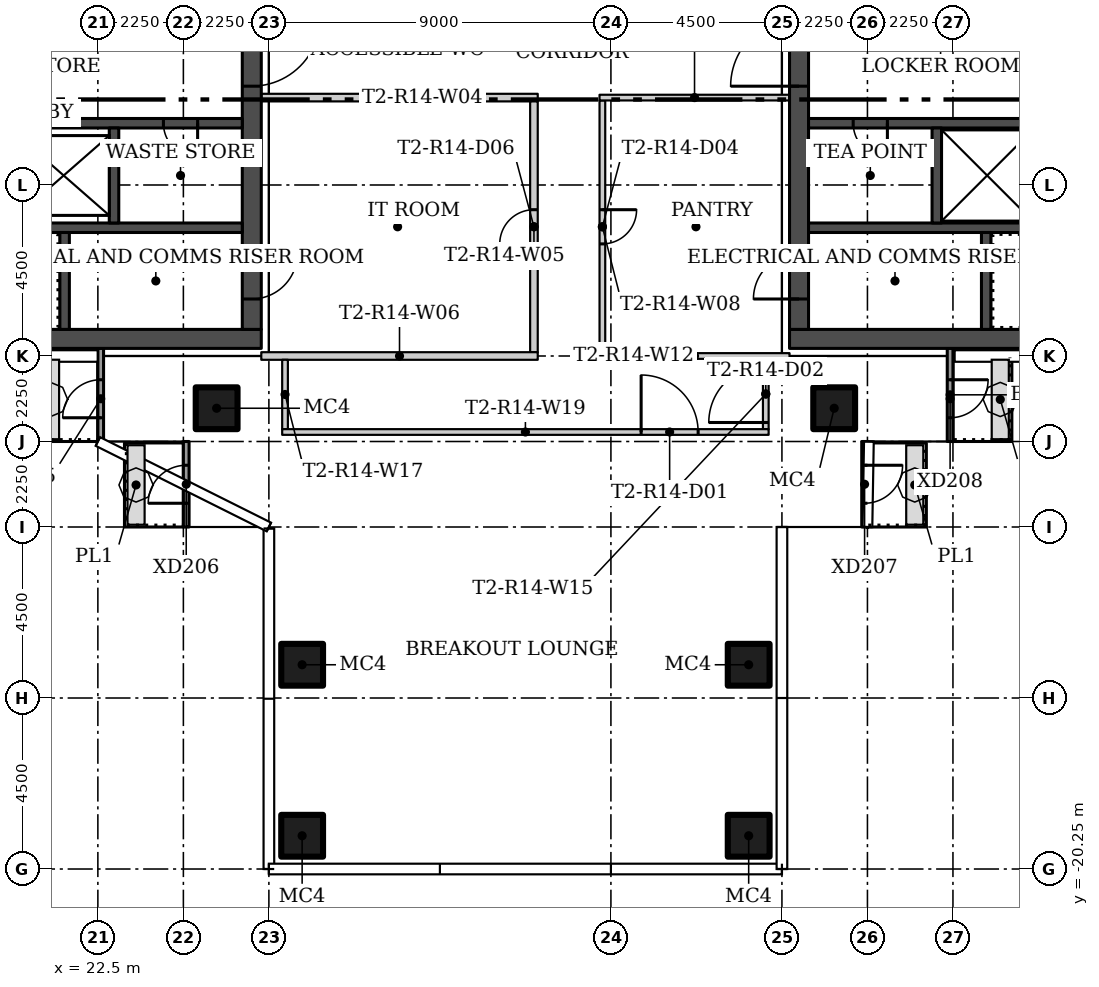
"""IFC4 building model, lengths in metres.
Left out: names, types, materials, properties, quantities, classifications, styles, units other than length and angle.
Written with IfcOpenShell. Run it as: python <this file> out.ifc"""

import sys

from ifc_helpers import new_model, si_unit, direction, frame, frame_2d, origin, origin_2d, place, context, subcontext, project, spatial, rectangle, hollow_rectangle, extrude, element, fill, save


model = new_model("IFC4")
c1 = context("Model", 3, precision=1e-05, world=origin(), true_north=direction((0.0, 1.0)))
c2 = subcontext(c1, "Body", "Model", "MODEL_VIEW")
j1 = project(units=[si_unit("LENGTHUNIT", "METRE"), si_unit("PLANEANGLEUNIT", "RADIAN")], contexts=[c1])
p1 = place(None, origin())
s1 = spatial("IfcSite", under=j1, at=p1, CompositionType="ELEMENT")
p2 = place(p1, origin())
s2 = spatial("IfcBuilding", under=s1, at=p2, CompositionType="ELEMENT")
p3 = place(p2, frame((0.0, 0.0, 138.9)))
s3 = spatial("IfcBuildingStorey", under=s2, at=p3, CompositionType="ELEMENT", Elevation=138.9)
for number, where in (
    (1, (25.625, -8.125, 0.0)),
    (2, (41.875, -8.125, 0.0)),
    (3, (39.625, -14.875, 0.0)),
    (4, (39.625, -19.375, 0.0)),
    (5, (27.875, -14.875, 0.0)),
    (6, (27.875, -19.375, 0.0)),
):
    element("IfcColumn", number, at=place(p3, frame(where)), inside=s3, PredefinedType="COLUMN", context=c2, shape_type="SweptSolid", body=[
        extrude(hollow_rectangle(XDim=1.1, YDim=1.1, WallThickness=0.04, at=origin_2d()), origin(), (0.0, 0.0, 1.0), 3.55),
    ])
p4 = place(p3, frame((34.075, 0.05, 0.0), z_axis=(0.0, 0.0, 1.0), x_axis=(-1.0, 0.0, 0.0)))
e7 = element("IfcWall", 7, at=p4, inside=s3, PredefinedType="PARTITIONING", context=c2, shape_type="SweptSolid", body=[
    extrude(rectangle(XDim=7.275, YDim=0.2, at=frame_2d((3.637, 0.0))), origin(), (0.0, 0.0, 1.0), 3.55),
])
p5 = place(p3, frame((33.975, -6.65, 0.0), z_axis=(0.0, 0.0, 1.0), x_axis=(0.0, 1.0, 0.0)))
e8 = element("IfcWall", 8, at=p5, inside=s3, PredefinedType="PARTITIONING", context=c2, shape_type="SweptSolid", body=[
    extrude(rectangle(XDim=6.6, YDim=0.2, at=frame_2d((3.3, 0.0))), origin(), (0.0, 0.0, 1.0), 3.55),
])
p6 = place(p5, frame((2.85, 0.0, 0.0)))
e9 = element("IfcOpeningElement", 9, at=p6, cuts=e8, PredefinedType="OPENING", context=c2, shape_type="SweptSolid", body=[
    extrude(rectangle(XDim=0.9, YDim=2.1, at=frame_2d((0.45, 1.05))), frame((0.0, 0.11, 0.0), z_axis=(0.0, -1.0, 0.0), x_axis=(1.0, 0.0, 0.0)), (0.0, 0.0, 1.0), 0.22),
])
p7 = place(p3, frame((26.8, -6.75, 0.0)))
e10 = element("IfcWall", 10, at=p7, inside=s3, PredefinedType="PARTITIONING", context=c2, shape_type="SweptSolid", body=[
    extrude(rectangle(XDim=7.275, YDim=0.2, at=frame_2d((3.637, 0.0))), origin(), (0.0, 0.0, 1.0), 3.55),
])
p8 = place(p3, frame((35.775, -0.025, 0.0), z_axis=(0.0, 0.0, 1.0), x_axis=(0.0, -1.0, 0.0)))
e11 = element("IfcWall", 11, at=p8, inside=s3, PredefinedType="PARTITIONING", context=c2, shape_type="SweptSolid", body=[
    extrude(rectangle(XDim=6.65, YDim=0.15, at=frame_2d((3.325, 0.0))), origin(), (0.0, 0.0, 1.0), 3.55),
])
p9 = place(p8, frame((2.875, 0.0, 0.0)))
e12 = element("IfcOpeningElement", 12, at=p9, cuts=e11, PredefinedType="OPENING", context=c2, shape_type="SweptSolid", body=[
    extrude(rectangle(XDim=0.9, YDim=2.1, at=frame_2d((0.45, 1.05))), frame((0.0, 0.085, 0.0), z_axis=(0.0, -1.0, 0.0), x_axis=(1.0, 0.0, 0.0)), (0.0, 0.0, 1.0), 0.17),
])
p10 = place(p3, frame((35.7, -6.75, 0.0)))
e13 = element("IfcWall", 13, at=p10, inside=s3, PredefinedType="PARTITIONING", context=c2, shape_type="SweptSolid", body=[
    extrude(rectangle(XDim=5.0, YDim=0.15, at=frame_2d((2.5, 0.0))), origin(), (0.0, 0.0, 1.0), 3.55),
])
p11 = place(p3, frame((40.7, 0.05, 0.0), z_axis=(0.0, 0.0, 1.0), x_axis=(-1.0, 0.0, 0.0)))
e14 = element("IfcWall", 14, at=p11, inside=s3, PredefinedType="PARTITIONING", context=c2, shape_type="SweptSolid", body=[
    extrude(rectangle(XDim=5.0, YDim=0.15, at=frame_2d((2.5, 0.0))), origin(), (0.0, 0.0, 1.0), 3.55),
])
p12 = place(p3, frame((40.075, -8.675, 0.0), z_axis=(0.0, 0.0, 1.0), x_axis=(0.0, 1.0, 0.0)))
e15 = element("IfcWall", 15, at=p12, inside=s3, PredefinedType="PARTITIONING", context=c2, shape_type="SweptSolid", body=[
    extrude(rectangle(XDim=1.85, YDim=0.15, at=frame_2d((0.925, 0.0))), origin(), (0.0, 0.0, 1.0), 3.55),
])
p13 = place(p12, frame((0.175, 0.0, 0.0)))
e16 = element("IfcOpeningElement", 16, at=p13, cuts=e15, PredefinedType="OPENING", context=c2, shape_type="SweptSolid", body=[
    extrude(rectangle(XDim=1.5, YDim=2.1, at=frame_2d((0.75, 1.05))), frame((0.0, 0.085, 0.0), z_axis=(0.0, -1.0, 0.0), x_axis=(1.0, 0.0, 0.0)), (0.0, 0.0, 1.0), 0.17),
])
p14 = place(p3, frame((27.425, -6.85, 0.0), z_axis=(0.0, 0.0, 1.0), x_axis=(0.0, -1.0, 0.0)))
e17 = element("IfcWall", 17, at=p14, inside=s3, PredefinedType="PARTITIONING", context=c2, shape_type="SweptSolid", body=[
    extrude(rectangle(XDim=1.825, YDim=0.15, at=frame_2d((0.913, 0.0))), origin(), (0.0, 0.0, 1.0), 3.55),
])
p15 = place(p3, frame((27.35, -8.75, 0.0)))
e18 = element("IfcWall", 18, at=p15, inside=s3, PredefinedType="PARTITIONING", context=c2, shape_type="SweptSolid", body=[
    extrude(rectangle(XDim=12.8, YDim=0.15, at=frame_2d((6.4, 0.0))), origin(), (0.0, 0.0, 1.0), 3.55),
])
p16 = place(p15, frame((9.445, 0.0, 0.0)))
e19 = element("IfcOpeningElement", 19, at=p16, cuts=e18, PredefinedType="OPENING", context=c2, shape_type="SweptSolid", body=[
    extrude(rectangle(XDim=1.5, YDim=2.1, at=frame_2d((0.75, 1.05))), frame((0.0, 0.085, 0.0), z_axis=(0.0, -1.0, 0.0), x_axis=(1.0, 0.0, 0.0)), (0.0, 0.0, 1.0), 0.17),
])
p17 = place(p3, frame((22.575, -9.0, 0.0), z_axis=(0.0, 0.0, 1.0), x_axis=(0.0, 1.0, 0.0)))
e20 = element("IfcWall", 20, at=p17, inside=s3, PredefinedType="SOLIDWALL", context=c2, shape_type="SweptSolid", body=[
    extrude(rectangle(XDim=2.457, YDim=0.15, at=frame_2d((1.229, 0.0))), origin(), (0.0, 0.0, 1.0), 3.45),
])
p18 = place(p17, frame((0.625, 0.0, 0.0)))
e21 = element("IfcOpeningElement", 21, at=p18, cuts=e20, PredefinedType="OPENING", context=c2, shape_type="SweptSolid", body=[
    extrude(rectangle(XDim=1.0, YDim=2.4, at=frame_2d((0.5, 1.2))), frame((0.0, 0.085, 0.0), z_axis=(0.0, -1.0, 0.0), x_axis=(1.0, 0.0, 0.0)), (0.0, 0.0, 1.0), 0.17),
])
p19 = place(p3, frame((24.825, -11.25, 0.0), z_axis=(0.0, 0.0, 1.0), x_axis=(0.0, 1.0, 0.0)))
e22 = element("IfcWall", 22, at=p19, inside=s3, PredefinedType="SOLIDWALL", context=c2, shape_type="SweptSolid", body=[
    extrude(rectangle(XDim=2.25, YDim=0.15, at=frame_2d((1.125, 0.0))), origin(), (0.0, 0.0, 1.0), 3.45),
])
p20 = place(p19, frame((0.625, 0.0, 0.0)))
e23 = element("IfcOpeningElement", 23, at=p20, cuts=e22, PredefinedType="OPENING", context=c2, shape_type="SweptSolid", body=[
    extrude(rectangle(XDim=1.0, YDim=2.4, at=frame_2d((0.5, 1.2))), frame((0.0, 0.085, 0.0), z_axis=(0.0, -1.0, 0.0), x_axis=(1.0, 0.0, 0.0)), (0.0, 0.0, 1.0), 0.17),
])
p21 = place(p3, frame((42.675, -9.0, 0.0), z_axis=(0.0, 0.0, 1.0), x_axis=(0.0, -1.0, 0.0)))
e24 = element("IfcWall", 24, at=p21, inside=s3, PredefinedType="SOLIDWALL", context=c2, shape_type="SweptSolid", body=[
    extrude(rectangle(XDim=2.25, YDim=0.15, at=frame_2d((1.125, 0.0))), origin(), (0.0, 0.0, 1.0), 3.45),
])
p22 = place(p21, frame((0.625, 0.0, 0.0)))
e25 = element("IfcOpeningElement", 25, at=p22, cuts=e24, PredefinedType="OPENING", context=c2, shape_type="SweptSolid", body=[
    extrude(rectangle(XDim=1.0, YDim=2.4, at=frame_2d((0.5, 1.2))), frame((0.0, 0.085, 0.0), z_axis=(0.0, -1.0, 0.0), x_axis=(1.0, 0.0, 0.0)), (0.0, 0.0, 1.0), 0.17),
])
p23 = place(p3, frame((44.925, -6.543, 0.0), z_axis=(0.0, 0.0, 1.0), x_axis=(0.0, -1.0, 0.0)))
e26 = element("IfcWall", 26, at=p23, inside=s3, PredefinedType="SOLIDWALL", context=c2, shape_type="SweptSolid", body=[
    extrude(rectangle(XDim=2.457, YDim=0.15, at=frame_2d((1.229, 0.0))), origin(), (0.0, 0.0, 1.0), 3.45),
])
p24 = place(p23, frame((0.832, 0.0, 0.0)))
e27 = element("IfcOpeningElement", 27, at=p24, cuts=e26, PredefinedType="OPENING", context=c2, shape_type="SweptSolid", body=[
    extrude(rectangle(XDim=1.0, YDim=2.4, at=frame_2d((0.5, 1.2))), frame((0.0, 0.085, 0.0), z_axis=(0.0, -1.0, 0.0), x_axis=(1.0, 0.0, 0.0)), (0.0, 0.0, 1.0), 0.17),
])
p25 = place(p3, frame((13.7, -6.3, 0.0)))
e28 = element("IfcWall", 28, at=p25, inside=s3, PredefinedType="SHEAR", context=c2, shape_type="SweptSolid", body=[
    extrude(rectangle(XDim=13.1, YDim=0.5, at=frame_2d((6.55, 0.0))), origin(), (0.0, 0.0, 1.0), 3.55),
])
p26 = place(p3, frame((26.55, 6.05, 0.0), z_axis=(0.0, 0.0, 1.0), x_axis=(0.0, -1.0, 0.0)))
e29 = element("IfcWall", 29, at=p26, inside=s3, PredefinedType="SHEAR", context=c2, shape_type="SweptSolid", body=[
    extrude(rectangle(XDim=12.1, YDim=0.5, at=frame_2d((6.05, 0.0))), origin(), (0.0, 0.0, 1.0), 3.55),
])
p27 = place(p26, frame((10.1, 0.0, 0.0)))
e30 = element("IfcOpeningElement", 30, at=p27, cuts=e29, PredefinedType="OPENING", context=c2, shape_type="SweptSolid", body=[
    extrude(rectangle(XDim=1.2, YDim=2.1, at=frame_2d((0.6, 1.05))), frame((0.0, 0.26, 0.0), z_axis=(0.0, -1.0, 0.0), x_axis=(1.0, 0.0, 0.0)), (0.0, 0.0, 1.0), 0.52),
])
p28 = place(p26, frame((3.9, 0.0, 0.0)))
e31 = element("IfcOpeningElement", 31, at=p28, cuts=e29, PredefinedType="OPENING", context=c2, shape_type="SweptSolid", body=[
    extrude(rectangle(XDim=1.8, YDim=2.4, at=frame_2d((0.9, 1.2))), frame((0.0, 0.26, 0.0), z_axis=(0.0, -1.0, 0.0), x_axis=(1.0, 0.0, 0.0)), (0.0, 0.0, 1.0), 0.52),
])
p29 = place(p3, frame((26.3, -3.375, 0.0), z_axis=(0.0, 0.0, 1.0), x_axis=(-1.0, 0.0, 0.0)))
e32 = element("IfcWall", 32, at=p29, inside=s3, PredefinedType="SHEAR", context=c2, shape_type="SweptSolid", body=[
    extrude(rectangle(XDim=12.1, YDim=0.25, at=frame_2d((6.05, 0.0))), origin(), (0.0, 0.0, 1.0), 3.55),
])
p30 = place(p29, frame((10.95, 0.0, 0.0)))
e33 = element("IfcOpeningElement", 33, at=p30, cuts=e32, PredefinedType="OPENING", context=c2, shape_type="SweptSolid", body=[
    extrude(rectangle(XDim=1.1, YDim=2.1, at=frame_2d((0.55, 1.05))), frame((0.0, 0.135, 0.0), z_axis=(0.0, -1.0, 0.0), x_axis=(1.0, 0.0, 0.0)), (0.0, 0.0, 1.0), 0.27),
])
p31 = place(p3, frame((21.625, -6.05, 0.0), z_axis=(0.0, 0.0, 1.0), x_axis=(0.0, 1.0, 0.0)))
e34 = element("IfcWall", 34, at=p31, inside=s3, PredefinedType="SHEAR", context=c2, shape_type="SweptSolid", body=[
    extrude(rectangle(XDim=2.55, YDim=0.25, at=frame_2d((1.275, 0.0))), origin(), (0.0, 0.0, 1.0), 3.55),
])
p32 = place(p3, frame((26.3, -0.625, 0.0), z_axis=(0.0, 0.0, 1.0), x_axis=(-1.0, 0.0, 0.0)))
e35 = element("IfcWall", 35, at=p32, inside=s3, PredefinedType="SHEAR", context=c2, shape_type="SweptSolid", body=[
    extrude(rectangle(XDim=12.1, YDim=0.25, at=frame_2d((6.05, 0.0))), origin(), (0.0, 0.0, 1.0), 3.55),
])
p33 = place(p32, frame((8.65, 0.0, 0.0)))
e36 = element("IfcOpeningElement", 36, at=p33, cuts=e35, PredefinedType="OPENING", context=c2, shape_type="SweptSolid", body=[
    extrude(rectangle(XDim=1.2, YDim=2.1, at=frame_2d((0.6, 1.05))), frame((0.0, 0.135, 0.0), z_axis=(0.0, -1.0, 0.0), x_axis=(1.0, 0.0, 0.0)), (0.0, 0.0, 1.0), 0.27),
])
p34 = place(p32, frame((1.175, 0.0, 0.0)))
e37 = element("IfcOpeningElement", 37, at=p34, cuts=e35, PredefinedType="OPENING", context=c2, shape_type="SweptSolid", body=[
    extrude(rectangle(XDim=0.9, YDim=2.1, at=frame_2d((0.45, 1.05))), frame((0.0, 0.135, 0.0), z_axis=(0.0, -1.0, 0.0), x_axis=(1.0, 0.0, 0.0)), (0.0, 0.0, 1.0), 0.27),
])
p35 = place(p3, frame((22.925, -3.25, 0.0), z_axis=(0.0, 0.0, 1.0), x_axis=(0.0, 1.0, 0.0)))
e38 = element("IfcWall", 38, at=p35, inside=s3, PredefinedType="SHEAR", context=c2, shape_type="SweptSolid", body=[
    extrude(rectangle(XDim=2.5, YDim=0.25, at=frame_2d((1.25, 0.0))), origin(), (0.0, 0.0, 1.0), 3.55),
])
p36 = place(p3, frame((53.8, -6.3, 0.0), z_axis=(0.0, 0.0, 1.0), x_axis=(-1.0, 0.0, 0.0)))
e39 = element("IfcWall", 39, at=p36, inside=s3, PredefinedType="SHEAR", context=c2, shape_type="SweptSolid", body=[
    extrude(rectangle(XDim=13.1, YDim=0.5, at=frame_2d((6.55, 0.0))), origin(), (0.0, 0.0, 1.0), 3.55),
])
p37 = place(p3, frame((40.95, -6.05, 0.0), z_axis=(0.0, 0.0, 1.0), x_axis=(0.0, 1.0, 0.0)))
e40 = element("IfcWall", 40, at=p37, inside=s3, PredefinedType="SHEAR", context=c2, shape_type="SweptSolid", body=[
    extrude(rectangle(XDim=12.1, YDim=0.5, at=frame_2d((6.05, 0.0))), origin(), (0.0, 0.0, 1.0), 3.55),
])
p38 = place(p37, frame((0.8, 0.0, 0.0)))
e41 = element("IfcOpeningElement", 41, at=p38, cuts=e40, PredefinedType="OPENING", context=c2, shape_type="SweptSolid", body=[
    extrude(rectangle(XDim=1.2, YDim=2.1, at=frame_2d((0.6, 1.05))), frame((0.0, 0.26, 0.0), z_axis=(0.0, -1.0, 0.0), x_axis=(1.0, 0.0, 0.0)), (0.0, 0.0, 1.0), 0.52),
])
p39 = place(p37, frame((6.4, 0.0, 0.0)))
e42 = element("IfcOpeningElement", 42, at=p39, cuts=e40, PredefinedType="OPENING", context=c2, shape_type="SweptSolid", body=[
    extrude(rectangle(XDim=1.8, YDim=2.4, at=frame_2d((0.9, 1.2))), frame((0.0, 0.26, 0.0), z_axis=(0.0, -1.0, 0.0), x_axis=(1.0, 0.0, 0.0)), (0.0, 0.0, 1.0), 0.52),
])
p40 = place(p3, frame((53.3, -3.375, 0.0), z_axis=(0.0, 0.0, 1.0), x_axis=(-1.0, 0.0, 0.0)))
e43 = element("IfcWall", 43, at=p40, inside=s3, PredefinedType="SHEAR", context=c2, shape_type="SweptSolid", body=[
    extrude(rectangle(XDim=12.1, YDim=0.25, at=frame_2d((6.05, 0.0))), origin(), (0.0, 0.0, 1.0), 3.55),
])
p41 = place(p40, frame((0.05, 0.0, 0.0)))
e44 = element("IfcOpeningElement", 44, at=p41, cuts=e43, PredefinedType="OPENING", context=c2, shape_type="SweptSolid", body=[
    extrude(rectangle(XDim=1.1, YDim=2.1, at=frame_2d((0.55, 1.05))), frame((0.0, 0.135, 0.0), z_axis=(0.0, -1.0, 0.0), x_axis=(1.0, 0.0, 0.0)), (0.0, 0.0, 1.0), 0.27),
])
p42 = place(p3, frame((45.875, -6.05, 0.0), z_axis=(0.0, 0.0, 1.0), x_axis=(0.0, 1.0, 0.0)))
e45 = element("IfcWall", 45, at=p42, inside=s3, PredefinedType="SHEAR", context=c2, shape_type="SweptSolid", body=[
    extrude(rectangle(XDim=2.55, YDim=0.25, at=frame_2d((1.275, 0.0))), origin(), (0.0, 0.0, 1.0), 3.55),
])
p43 = place(p3, frame((53.3, -0.625, 0.0), z_axis=(0.0, 0.0, 1.0), x_axis=(-1.0, 0.0, 0.0)))
e46 = element("IfcWall", 46, at=p43, inside=s3, PredefinedType="SHEAR", context=c2, shape_type="SweptSolid", body=[
    extrude(rectangle(XDim=12.1, YDim=0.25, at=frame_2d((6.05, 0.0))), origin(), (0.0, 0.0, 1.0), 3.55),
])
p44 = place(p43, frame((2.25, 0.0, 0.0)))
e47 = element("IfcOpeningElement", 47, at=p44, cuts=e46, PredefinedType="OPENING", context=c2, shape_type="SweptSolid", body=[
    extrude(rectangle(XDim=1.2, YDim=2.1, at=frame_2d((0.6, 1.05))), frame((0.0, 0.135, 0.0), z_axis=(0.0, -1.0, 0.0), x_axis=(1.0, 0.0, 0.0)), (0.0, 0.0, 1.0), 0.27),
])
p45 = place(p43, frame((10.025, 0.0, 0.0)))
e48 = element("IfcOpeningElement", 48, at=p45, cuts=e46, PredefinedType="OPENING", context=c2, shape_type="SweptSolid", body=[
    extrude(rectangle(XDim=0.9, YDim=2.1, at=frame_2d((0.45, 1.05))), frame((0.0, 0.135, 0.0), z_axis=(0.0, -1.0, 0.0), x_axis=(1.0, 0.0, 0.0)), (0.0, 0.0, 1.0), 0.27),
])
p46 = place(p3, frame((44.575, -3.25, 0.0), z_axis=(0.0, 0.0, 1.0), x_axis=(0.0, 1.0, 0.0)))
e49 = element("IfcWall", 49, at=p46, inside=s3, PredefinedType="SHEAR", context=c2, shape_type="SweptSolid", body=[
    extrude(rectangle(XDim=2.5, YDim=0.25, at=frame_2d((1.25, 0.0))), origin(), (0.0, 0.0, 1.0), 3.55),
])
p47 = place(p16, origin())
e50 = element("IfcDoor", 50, at=p47, inside=s3, OperationType="DOUBLE_DOOR_SINGLE_SWING", PredefinedType="DOOR", context=c2, shape_type="SweptSolid", body=[
    extrude(rectangle(XDim=1.5, YDim=2.1, at=frame_2d((0.75, 1.05))), frame((0.0, 0.025, 0.0), z_axis=(0.0, -1.0, 0.0), x_axis=(1.0, 0.0, 0.0)), (0.0, 0.0, 1.0), 0.05),
])
fill(e19, e50)
p48 = place(p13, origin())
e51 = element("IfcDoor", 51, at=p48, inside=s3, OperationType="DOUBLE_DOOR_SINGLE_SWING", PredefinedType="DOOR", context=c2, shape_type="SweptSolid", body=[
    extrude(rectangle(XDim=1.5, YDim=2.1, at=frame_2d((0.75, 1.05))), frame((0.0, 0.025, 0.0), z_axis=(0.0, -1.0, 0.0), x_axis=(1.0, 0.0, 0.0)), (0.0, 0.0, 1.0), 0.05),
])
fill(e16, e51)
p49 = place(p9, origin())
e52 = element("IfcDoor", 52, at=p49, inside=s3, OperationType="SINGLE_SWING_LEFT", PredefinedType="DOOR", context=c2, shape_type="SweptSolid", body=[
    extrude(rectangle(XDim=0.9, YDim=2.1, at=frame_2d((0.45, 1.05))), frame((0.0, 0.025, 0.0), z_axis=(0.0, -1.0, 0.0), x_axis=(1.0, 0.0, 0.0)), (0.0, 0.0, 1.0), 0.05),
])
fill(e12, e52)
p50 = place(p6, origin())
e53 = element("IfcDoor", 53, at=p50, inside=s3, OperationType="SINGLE_SWING_LEFT", PredefinedType="DOOR", context=c2, shape_type="SweptSolid", body=[
    extrude(rectangle(XDim=0.9, YDim=2.1, at=frame_2d((0.45, 1.05))), frame((0.0, 0.025, 0.0), z_axis=(0.0, -1.0, 0.0), x_axis=(1.0, 0.0, 0.0)), (0.0, 0.0, 1.0), 0.05),
])
fill(e9, e53)
p51 = place(p18, origin())
e54 = element("IfcDoor", 54, at=p51, inside=s3, OperationType="SINGLE_SWING_LEFT", PredefinedType="DOOR", context=c2, shape_type="SweptSolid", body=[
    extrude(rectangle(XDim=1.0, YDim=2.4, at=frame_2d((0.5, 1.2))), frame((0.0, 0.025, 0.0), z_axis=(0.0, -1.0, 0.0), x_axis=(1.0, 0.0, 0.0)), (0.0, 0.0, 1.0), 0.05),
])
fill(e21, e54)
p52 = place(p20, origin())
e55 = element("IfcDoor", 55, at=p52, inside=s3, OperationType="SINGLE_SWING_RIGHT", PredefinedType="DOOR", context=c2, shape_type="SweptSolid", body=[
    extrude(rectangle(XDim=1.0, YDim=2.4, at=frame_2d((0.5, 1.2))), frame((0.0, 0.025, 0.0), z_axis=(0.0, -1.0, 0.0), x_axis=(1.0, 0.0, 0.0)), (0.0, 0.0, 1.0), 0.05),
])
fill(e23, e55)
p53 = place(p22, origin())
e56 = element("IfcDoor", 56, at=p53, inside=s3, OperationType="SINGLE_SWING_LEFT", PredefinedType="DOOR", context=c2, shape_type="SweptSolid", body=[
    extrude(rectangle(XDim=1.0, YDim=2.4, at=frame_2d((0.5, 1.2))), frame((0.0, 0.025, 0.0), z_axis=(0.0, -1.0, 0.0), x_axis=(1.0, 0.0, 0.0)), (0.0, 0.0, 1.0), 0.05),
])
fill(e25, e56)
p54 = place(p24, origin())
e57 = element("IfcDoor", 57, at=p54, inside=s3, OperationType="SINGLE_SWING_RIGHT", PredefinedType="DOOR", context=c2, shape_type="SweptSolid", body=[
    extrude(rectangle(XDim=1.0, YDim=2.4, at=frame_2d((0.5, 1.2))), frame((0.0, 0.025, 0.0), z_axis=(0.0, -1.0, 0.0), x_axis=(1.0, 0.0, 0.0)), (0.0, 0.0, 1.0), 0.05),
])
fill(e27, e57)
p55 = place(p27, origin())
e58 = element("IfcDoor", 58, at=p55, inside=s3, OperationType="SINGLE_SWING_RIGHT", PredefinedType="DOOR", context=c2, shape_type="SweptSolid", body=[
    extrude(rectangle(XDim=1.2, YDim=2.1, at=frame_2d((0.6, 1.05))), frame((0.0, 0.025, 0.0), z_axis=(0.0, -1.0, 0.0), x_axis=(1.0, 0.0, 0.0)), (0.0, 0.0, 1.0), 0.05),
])
fill(e30, e58)
p56 = place(p28, origin())
e59 = element("IfcDoor", 59, at=p56, inside=s3, OperationType="DOUBLE_DOOR_SINGLE_SWING", PredefinedType="DOOR", context=c2, shape_type="SweptSolid", body=[
    extrude(rectangle(XDim=1.8, YDim=2.4, at=frame_2d((0.9, 1.2))), frame((0.0, 0.025, 0.0), z_axis=(0.0, -1.0, 0.0), x_axis=(1.0, 0.0, 0.0)), (0.0, 0.0, 1.0), 0.05),
])
fill(e31, e59)
p57 = place(p34, origin())
e60 = element("IfcDoor", 60, at=p57, inside=s3, OperationType="SINGLE_SWING_LEFT", PredefinedType="DOOR", context=c2, shape_type="SweptSolid", body=[
    extrude(rectangle(XDim=0.9, YDim=2.1, at=frame_2d((0.45, 1.05))), frame((0.0, 0.025, 0.0), z_axis=(0.0, -1.0, 0.0), x_axis=(1.0, 0.0, 0.0)), (0.0, 0.0, 1.0), 0.05),
])
fill(e37, e60)
p58 = place(p38, origin())
e61 = element("IfcDoor", 61, at=p58, inside=s3, OperationType="SINGLE_SWING_LEFT", PredefinedType="DOOR", context=c2, shape_type="SweptSolid", body=[
    extrude(rectangle(XDim=1.2, YDim=2.1, at=frame_2d((0.6, 1.05))), frame((0.0, 0.025, 0.0), z_axis=(0.0, -1.0, 0.0), x_axis=(1.0, 0.0, 0.0)), (0.0, 0.0, 1.0), 0.05),
])
fill(e41, e61)
p59 = place(p39, origin())
e62 = element("IfcDoor", 62, at=p59, inside=s3, OperationType="DOUBLE_DOOR_SINGLE_SWING", PredefinedType="DOOR", context=c2, shape_type="SweptSolid", body=[
    extrude(rectangle(XDim=1.8, YDim=2.4, at=frame_2d((0.9, 1.2))), frame((0.0, 0.025, 0.0), z_axis=(0.0, -1.0, 0.0), x_axis=(1.0, 0.0, 0.0)), (0.0, 0.0, 1.0), 0.05),
])
fill(e42, e62)
p60 = place(p45, origin())
e63 = element("IfcDoor", 63, at=p60, inside=s3, OperationType="SINGLE_SWING_RIGHT", PredefinedType="DOOR", context=c2, shape_type="SweptSolid", body=[
    extrude(rectangle(XDim=0.9, YDim=2.1, at=frame_2d((0.45, 1.05))), frame((0.0, 0.025, 0.0), z_axis=(0.0, -1.0, 0.0), x_axis=(1.0, 0.0, 0.0)), (0.0, 0.0, 1.0), 0.05),
])
fill(e48, e63)
save(model, sys.argv[1])
